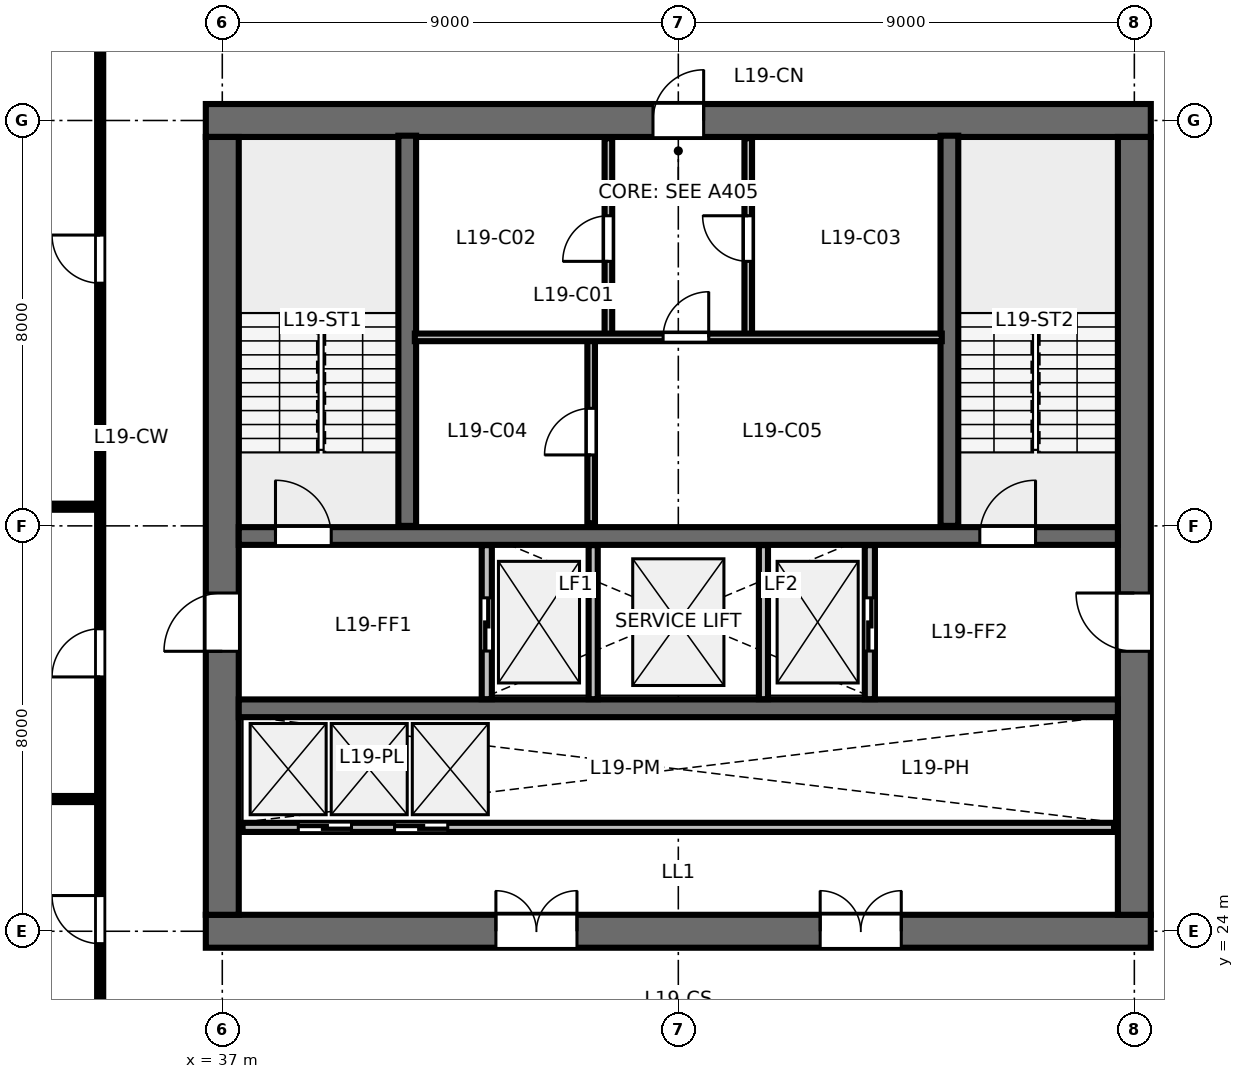
"""IFC4 building model, lengths in metres.
Left out: names, types, materials, properties, quantities, classifications, styles, units other than length and angle.
Written with IfcOpenShell. Run it as: python <this file> out.ifc"""

import sys

from ifc_helpers import new_model, si_unit, direction, frame, frame_2d, origin, place, context, subcontext, project, spatial, rectangle, extrude, element, fill, save


model = new_model("IFC4")
c1 = context("Model", 3, precision=1e-05, world=origin(), true_north=direction((0.0, 1.0)))
c2 = subcontext(c1, "Body", "Model", "MODEL_VIEW")
j1 = project(units=[si_unit("LENGTHUNIT", "METRE"), si_unit("PLANEANGLEUNIT", "RADIAN")], contexts=[c1])
p1 = place(None, origin())
s1 = spatial("IfcSite", under=j1, at=p1, CompositionType="ELEMENT")
p2 = place(p1, origin())
s2 = spatial("IfcBuilding", under=s1, at=p2, CompositionType="ELEMENT")
p3 = place(p2, frame((0.0, 0.0, 74.8)))
s3 = spatial("IfcBuildingStorey", under=s2, at=p3, CompositionType="ELEMENT", Elevation=74.8)
p4 = place(p3, frame((36.675, 24.0, 0.0), z_axis=(0.0, 0.0, 1.0), x_axis=(1.0, 0.0, 0.0)))
e1 = element("IfcWall", 1, at=p4, inside=s3, PredefinedType="SHEAR", context=c2, shape_type="SweptSolid", body=[
    extrude(rectangle(XDim=18.65, YDim=0.65, at=frame_2d((9.325, 0.0))), origin(), (0.0, 0.0, 1.0), 3.36),
])
p5 = place(p4, frame((5.725, 0.0, 0.0)))
e2 = element("IfcOpeningElement", 2, at=p5, cuts=e1, PredefinedType="OPENING", context=c2, shape_type="SweptSolid", body=[
    extrude(rectangle(XDim=1.6, YDim=2.15, at=frame_2d((0.8, 1.075))), frame((0.0, 0.335, 0.0), z_axis=(0.0, -1.0, 0.0), x_axis=(1.0, 0.0, 0.0)), (0.0, 0.0, 1.0), 0.67),
])
p6 = place(p4, frame((12.125, 0.0, 0.0)))
e3 = element("IfcOpeningElement", 3, at=p6, cuts=e1, PredefinedType="OPENING", context=c2, shape_type="SweptSolid", body=[
    extrude(rectangle(XDim=1.6, YDim=2.15, at=frame_2d((0.8, 1.075))), frame((0.0, 0.335, 0.0), z_axis=(0.0, -1.0, 0.0), x_axis=(1.0, 0.0, 0.0)), (0.0, 0.0, 1.0), 0.67),
])
p7 = place(p3, frame((36.675, 40.0, 0.0), z_axis=(0.0, 0.0, 1.0), x_axis=(1.0, 0.0, 0.0)))
e4 = element("IfcWall", 4, at=p7, inside=s3, PredefinedType="SHEAR", context=c2, shape_type="SweptSolid", body=[
    extrude(rectangle(XDim=18.65, YDim=0.65, at=frame_2d((9.325, 0.0))), origin(), (0.0, 0.0, 1.0), 3.36),
])
p8 = place(p7, frame((8.825, 0.0, 0.0)))
e5 = element("IfcOpeningElement", 5, at=p8, cuts=e4, PredefinedType="OPENING", context=c2, shape_type="SweptSolid", body=[
    extrude(rectangle(XDim=1.0, YDim=2.15, at=frame_2d((0.5, 1.075))), frame((0.0, 0.335, 0.0), z_axis=(0.0, -1.0, 0.0), x_axis=(1.0, 0.0, 0.0)), (0.0, 0.0, 1.0), 0.67),
])
p9 = place(p3, frame((37.0, 24.325, 0.0), z_axis=(0.0, 0.0, 1.0), x_axis=(0.0, 1.0, 0.0)))
e6 = element("IfcWall", 6, at=p9, inside=s3, PredefinedType="SHEAR", context=c2, shape_type="SweptSolid", body=[
    extrude(rectangle(XDim=15.35, YDim=0.65, at=frame_2d((7.675, 0.0))), origin(), (0.0, 0.0, 1.0), 3.36),
])
p10 = place(p9, frame((5.2, 0.0, 0.0)))
e7 = element("IfcOpeningElement", 7, at=p10, cuts=e6, PredefinedType="OPENING", context=c2, shape_type="SweptSolid", body=[
    extrude(rectangle(XDim=1.15, YDim=2.15, at=frame_2d((0.575, 1.075))), frame((0.0, 0.335, 0.0), z_axis=(0.0, -1.0, 0.0), x_axis=(1.0, 0.0, 0.0)), (0.0, 0.0, 1.0), 0.67),
])
p11 = place(p3, frame((55.0, 24.325, 0.0), z_axis=(0.0, 0.0, 1.0), x_axis=(0.0, 1.0, 0.0)))
e8 = element("IfcWall", 8, at=p11, inside=s3, PredefinedType="SHEAR", context=c2, shape_type="SweptSolid", body=[
    extrude(rectangle(XDim=15.35, YDim=0.65, at=frame_2d((7.675, 0.0))), origin(), (0.0, 0.0, 1.0), 3.36),
])
p12 = place(p11, frame((5.2, 0.0, 0.0)))
e9 = element("IfcOpeningElement", 9, at=p12, cuts=e8, PredefinedType="OPENING", context=c2, shape_type="SweptSolid", body=[
    extrude(rectangle(XDim=1.15, YDim=2.15, at=frame_2d((0.575, 1.075))), frame((0.0, 0.335, 0.0), z_axis=(0.0, -1.0, 0.0), x_axis=(1.0, 0.0, 0.0)), (0.0, 0.0, 1.0), 0.67),
])
p13 = place(p3, frame((37.325, 31.8, 0.0), z_axis=(0.0, 0.0, 1.0), x_axis=(1.0, 0.0, 0.0)))
e10 = element("IfcWall", 10, at=p13, inside=s3, PredefinedType="SHEAR", context=c2, shape_type="SweptSolid", body=[
    extrude(rectangle(XDim=17.35, YDim=0.35, at=frame_2d((8.675, 0.0))), origin(), (0.0, 0.0, 1.0), 3.36),
])
p14 = place(p13, frame((0.725, 0.0, 0.0)))
e11 = element("IfcOpeningElement", 11, at=p14, cuts=e10, PredefinedType="OPENING", context=c2, shape_type="SweptSolid", body=[
    extrude(rectangle(XDim=1.1, YDim=2.15, at=frame_2d((0.55, 1.075))), frame((0.0, 0.185, 0.0), z_axis=(0.0, -1.0, 0.0), x_axis=(1.0, 0.0, 0.0)), (0.0, 0.0, 1.0), 0.37),
])
p15 = place(p13, frame((14.625, 0.0, 0.0)))
e12 = element("IfcOpeningElement", 12, at=p15, cuts=e10, PredefinedType="OPENING", context=c2, shape_type="SweptSolid", body=[
    extrude(rectangle(XDim=1.1, YDim=2.15, at=frame_2d((0.55, 1.075))), frame((0.0, 0.185, 0.0), z_axis=(0.0, -1.0, 0.0), x_axis=(1.0, 0.0, 0.0)), (0.0, 0.0, 1.0), 0.37),
])
p16 = place(p3, frame((37.325, 28.4, 0.0), z_axis=(0.0, 0.0, 1.0), x_axis=(1.0, 0.0, 0.0)))
e13 = element("IfcWall", 13, at=p16, inside=s3, PredefinedType="SHEAR", context=c2, shape_type="SweptSolid", body=[
    extrude(rectangle(XDim=17.35, YDim=0.35, at=frame_2d((8.675, 0.0))), origin(), (0.0, 0.0, 1.0), 3.36),
])
for number, where, z_axis, x_axis in (
    (14, (40.65, 32.0, 0.0), (0.0, 0.0, 1.0), (0.0, 1.0, 0.0)),
    (15, (51.35, 32.0, 0.0), (0.0, 0.0, 1.0), (0.0, 1.0, 0.0)),
):
    element("IfcWall", number, at=place(p3, frame(where, z_axis=z_axis, x_axis=x_axis)), inside=s3, PredefinedType="SHEAR", context=c2, shape_type="SweptSolid", body=[
        extrude(rectangle(XDim=7.7, YDim=0.35, at=frame_2d((3.85, 0.0))), origin(), (0.0, 0.0, 1.0), 3.6),
    ])
p17 = place(p3, frame((44.62, 35.72, 0.0), z_axis=(0.0, 0.0, 1.0), x_axis=(0.0, 1.0, 0.0)))
e16 = element("IfcWall", 16, at=p17, inside=s3, PredefinedType="PARTITIONING", context=c2, shape_type="SweptSolid", body=[
    extrude(rectangle(XDim=3.93, YDim=0.15, at=frame_2d((1.965, 0.0))), origin(), (0.0, 0.0, 1.0), 3.36),
])
p18 = place(p17, frame((1.5, 0.0, 0.0)))
e17 = element("IfcOpeningElement", 17, at=p18, cuts=e16, PredefinedType="OPENING", context=c2, shape_type="SweptSolid", body=[
    extrude(rectangle(XDim=0.9, YDim=2.15, at=frame_2d((0.45, 1.075))), frame((0.0, 0.085, 0.0), z_axis=(0.0, -1.0, 0.0), x_axis=(1.0, 0.0, 0.0)), (0.0, 0.0, 1.0), 0.17),
])
p19 = place(p3, frame((47.38, 35.72, 0.0), z_axis=(0.0, 0.0, 1.0), x_axis=(0.0, 1.0, 0.0)))
e18 = element("IfcWall", 18, at=p19, inside=s3, PredefinedType="PARTITIONING", context=c2, shape_type="SweptSolid", body=[
    extrude(rectangle(XDim=3.93, YDim=0.15, at=frame_2d((1.965, 0.0))), origin(), (0.0, 0.0, 1.0), 3.36),
])
p20 = place(p19, frame((1.5, 0.0, 0.0)))
e19 = element("IfcOpeningElement", 19, at=p20, cuts=e18, PredefinedType="OPENING", context=c2, shape_type="SweptSolid", body=[
    extrude(rectangle(XDim=0.9, YDim=2.15, at=frame_2d((0.45, 1.075))), frame((0.0, 0.085, 0.0), z_axis=(0.0, -1.0, 0.0), x_axis=(1.0, 0.0, 0.0)), (0.0, 0.0, 1.0), 0.17),
])
p21 = place(p3, frame((44.28, 32.05, 0.0), z_axis=(0.0, 0.0, 1.0), x_axis=(0.0, 1.0, 0.0)))
e20 = element("IfcWall", 20, at=p21, inside=s3, PredefinedType="PARTITIONING", context=c2, shape_type="SweptSolid", body=[
    extrude(rectangle(XDim=3.67, YDim=0.15, at=frame_2d((1.835, 0.0))), origin(), (0.0, 0.0, 1.0), 3.36),
])
p22 = place(p21, frame((1.35, 0.0, 0.0)))
e21 = element("IfcOpeningElement", 21, at=p22, cuts=e20, PredefinedType="OPENING", context=c2, shape_type="SweptSolid", body=[
    extrude(rectangle(XDim=0.92, YDim=2.15, at=frame_2d((0.46, 1.075))), frame((0.0, 0.085, 0.0), z_axis=(0.0, -1.0, 0.0), x_axis=(1.0, 0.0, 0.0)), (0.0, 0.0, 1.0), 0.17),
])
p23 = place(p3, frame((40.8, 35.72, 0.0), z_axis=(0.0, 0.0, 1.0), x_axis=(1.0, 0.0, 0.0)))
e22 = element("IfcWall", 22, at=p23, inside=s3, PredefinedType="PARTITIONING", context=c2, shape_type="SweptSolid", body=[
    extrude(rectangle(XDim=10.4, YDim=0.15, at=frame_2d((5.2, 0.0))), origin(), (0.0, 0.0, 1.0), 3.36),
])
p24 = place(p23, frame((4.9, 0.0, 0.0)))
e23 = element("IfcOpeningElement", 23, at=p24, cuts=e22, PredefinedType="OPENING", context=c2, shape_type="SweptSolid", body=[
    extrude(rectangle(XDim=0.9, YDim=2.15, at=frame_2d((0.45, 1.075))), frame((0.0, 0.085, 0.0), z_axis=(0.0, -1.0, 0.0), x_axis=(1.0, 0.0, 0.0)), (0.0, 0.0, 1.0), 0.17),
])
p25 = place(p3, frame((42.22, 28.58, 0.0), z_axis=(0.0, 0.0, 1.0), x_axis=(0.0, 1.0, 0.0)))
e24 = element("IfcWall", 24, at=p25, inside=s3, PredefinedType="PARTITIONING", context=c2, shape_type="SweptSolid", body=[
    extrude(rectangle(XDim=3.04, YDim=0.2, at=frame_2d((1.52, 0.0))), origin(), (0.0, 0.0, 1.0), 3.36),
])
p26 = place(p25, frame((0.95, 0.0, 0.0)))
e25 = element("IfcOpeningElement", 25, at=p26, cuts=e24, PredefinedType="OPENING", context=c2, shape_type="SweptSolid", body=[
    extrude(rectangle(XDim=1.05, YDim=2.15, at=frame_2d((0.525, 1.075))), frame((0.0, 0.11, 0.0), z_axis=(0.0, -1.0, 0.0), x_axis=(1.0, 0.0, 0.0)), (0.0, 0.0, 1.0), 0.22),
])
p27 = place(p3, frame((49.78, 28.58, 0.0), z_axis=(0.0, 0.0, 1.0), x_axis=(0.0, 1.0, 0.0)))
e26 = element("IfcWall", 26, at=p27, inside=s3, PredefinedType="PARTITIONING", context=c2, shape_type="SweptSolid", body=[
    extrude(rectangle(XDim=3.04, YDim=0.2, at=frame_2d((1.52, 0.0))), origin(), (0.0, 0.0, 1.0), 3.36),
])
p28 = place(p27, frame((0.95, 0.0, 0.0)))
e27 = element("IfcOpeningElement", 27, at=p28, cuts=e26, PredefinedType="OPENING", context=c2, shape_type="SweptSolid", body=[
    extrude(rectangle(XDim=1.05, YDim=2.15, at=frame_2d((0.525, 1.075))), frame((0.0, 0.11, 0.0), z_axis=(0.0, -1.0, 0.0), x_axis=(1.0, 0.0, 0.0)), (0.0, 0.0, 1.0), 0.22),
])
for number, where, z_axis, x_axis in (
    (28, (44.32, 28.58, 0.0), (0.0, 0.0, 1.0), (0.0, 1.0, 0.0)),
    (29, (47.68, 28.58, 0.0), (0.0, 0.0, 1.0), (0.0, 1.0, 0.0)),
):
    element("IfcWall", number, at=place(p3, frame(where, z_axis=z_axis, x_axis=x_axis)), inside=s3, PredefinedType="PARTITIONING", context=c2, shape_type="SweptSolid", body=[
        extrude(rectangle(XDim=3.04, YDim=0.18, at=frame_2d((1.52, 0.0))), origin(), (0.0, 0.0, 1.0), 3.36),
    ])
p29 = place(p3, frame((37.4, 26.05, 0.0), z_axis=(0.0, 0.0, 1.0), x_axis=(1.0, 0.0, 0.0)))
e30 = element("IfcWall", 30, at=p29, inside=s3, PredefinedType="PARTITIONING", context=c2, shape_type="SweptSolid", body=[
    extrude(rectangle(XDim=17.2, YDim=0.18, at=frame_2d((8.6, 0.0))), origin(), (0.0, 0.0, 1.0), 3.36),
])
p30 = place(p29, frame((1.1, 0.0, 0.0)))
e31 = element("IfcOpeningElement", 31, at=p30, cuts=e30, PredefinedType="OPENING", context=c2, shape_type="SweptSolid", body=[
    extrude(rectangle(XDim=1.05, YDim=2.15, at=frame_2d((0.525, 1.075))), frame((0.0, 0.1, 0.0), z_axis=(0.0, -1.0, 0.0), x_axis=(1.0, 0.0, 0.0)), (0.0, 0.0, 1.0), 0.2),
])
p31 = place(p29, frame((3.0, 0.0, 0.0)))
e32 = element("IfcOpeningElement", 32, at=p31, cuts=e30, PredefinedType="OPENING", context=c2, shape_type="SweptSolid", body=[
    extrude(rectangle(XDim=1.05, YDim=2.15, at=frame_2d((0.525, 1.075))), frame((0.0, 0.1, 0.0), z_axis=(0.0, -1.0, 0.0), x_axis=(1.0, 0.0, 0.0)), (0.0, 0.0, 1.0), 0.2),
])
p32 = place(p3, frame((34.59, 26.61, 0.0), z_axis=(0.0, 0.0, 1.0), x_axis=(-1.0, 0.0, 0.0)))
e33 = element("IfcWall", 33, at=p32, inside=s3, PredefinedType="PARTITIONING", context=c2, shape_type="SweptSolid", body=[
    extrude(rectangle(XDim=13.41, YDim=0.12, at=frame_2d((6.705, 0.0))), origin(), (0.0, 0.0, 1.0), 2.64),
])
p33 = place(p32, frame((1.4, 0.0, 0.0)))
e34 = element("IfcOpeningElement", 34, at=p33, cuts=e33, PredefinedType="OPENING", context=c2, shape_type="SweptSolid", body=[
    extrude(rectangle(XDim=0.9, YDim=2.15, at=frame_2d((0.45, 1.075))), frame((0.0, 0.07, 0.0), z_axis=(0.0, -1.0, 0.0), x_axis=(1.0, 0.0, 0.0)), (0.0, 0.0, 1.0), 0.14),
])
p34 = place(p3, frame((34.59, 32.378, 0.0), z_axis=(0.0, 0.0, 1.0), x_axis=(-1.0, 0.0, 0.0)))
e35 = element("IfcWall", 35, at=p34, inside=s3, PredefinedType="PARTITIONING", context=c2, shape_type="SweptSolid", body=[
    extrude(rectangle(XDim=13.41, YDim=0.12, at=frame_2d((6.705, 0.0))), origin(), (0.0, 0.0, 1.0), 2.64),
])
p35 = place(p34, frame((1.4, 0.0, 0.0)))
e36 = element("IfcOpeningElement", 36, at=p35, cuts=e35, PredefinedType="OPENING", context=c2, shape_type="SweptSolid", body=[
    extrude(rectangle(XDim=0.9, YDim=2.15, at=frame_2d((0.45, 1.075))), frame((0.0, 0.07, 0.0), z_axis=(0.0, -1.0, 0.0), x_axis=(1.0, 0.0, 0.0)), (0.0, 0.0, 1.0), 0.14),
])
p36 = place(p3, frame((34.59, 21.65, 0.0), z_axis=(0.0, 0.0, 1.0), x_axis=(0.0, 1.0, 0.0)))
e37 = element("IfcWall", 37, at=p36, inside=s3, PredefinedType="PARTITIONING", context=c2, shape_type="SweptSolid", body=[
    extrude(rectangle(XDim=20.7, YDim=0.12, at=frame_2d((10.35, 0.0))), origin(), (0.0, 0.0, 1.0), 2.64),
])
p37 = place(p36, frame((2.105, 0.0, 0.0)))
e38 = element("IfcOpeningElement", 38, at=p37, cuts=e37, PredefinedType="OPENING", context=c2, shape_type="SweptSolid", body=[
    extrude(rectangle(XDim=0.95, YDim=2.15, at=frame_2d((0.475, 1.075))), frame((0.0, 0.07, 0.0), z_axis=(0.0, -1.0, 0.0), x_axis=(1.0, 0.0, 0.0)), (0.0, 0.0, 1.0), 0.14),
])
p38 = place(p36, frame((7.369, 0.0, 0.0)))
e39 = element("IfcOpeningElement", 39, at=p38, cuts=e37, PredefinedType="OPENING", context=c2, shape_type="SweptSolid", body=[
    extrude(rectangle(XDim=0.95, YDim=2.15, at=frame_2d((0.475, 1.075))), frame((0.0, 0.07, 0.0), z_axis=(0.0, -1.0, 0.0), x_axis=(1.0, 0.0, 0.0)), (0.0, 0.0, 1.0), 0.14),
])
p39 = place(p36, frame((15.139, 0.0, 0.0)))
e40 = element("IfcOpeningElement", 40, at=p39, cuts=e37, PredefinedType="OPENING", context=c2, shape_type="SweptSolid", body=[
    extrude(rectangle(XDim=0.95, YDim=2.15, at=frame_2d((0.475, 1.075))), frame((0.0, 0.07, 0.0), z_axis=(0.0, -1.0, 0.0), x_axis=(1.0, 0.0, 0.0)), (0.0, 0.0, 1.0), 0.14),
])
p40 = place(p14, origin())
e41 = element("IfcDoor", 41, at=p40, inside=s3, OperationType="SINGLE_SWING_LEFT", PredefinedType="DOOR", context=c2, shape_type="SweptSolid", body=[
    extrude(rectangle(XDim=1.1, YDim=2.15, at=frame_2d((0.55, 1.075))), frame((0.0, 0.025, 0.0), z_axis=(0.0, -1.0, 0.0), x_axis=(1.0, 0.0, 0.0)), (0.0, 0.0, 1.0), 0.05),
])
fill(e11, e41)
p41 = place(p15, origin())
e42 = element("IfcDoor", 42, at=p41, inside=s3, OperationType="SINGLE_SWING_RIGHT", PredefinedType="DOOR", context=c2, shape_type="SweptSolid", body=[
    extrude(rectangle(XDim=1.1, YDim=2.15, at=frame_2d((0.55, 1.075))), frame((0.0, 0.025, 0.0), z_axis=(0.0, -1.0, 0.0), x_axis=(1.0, 0.0, 0.0)), (0.0, 0.0, 1.0), 0.05),
])
fill(e12, e42)
p42 = place(p8, origin())
e43 = element("IfcDoor", 43, at=p42, inside=s3, OperationType="SINGLE_SWING_RIGHT", PredefinedType="DOOR", context=c2, shape_type="SweptSolid", body=[
    extrude(rectangle(XDim=1.0, YDim=2.15, at=frame_2d((0.5, 1.075))), frame((0.0, 0.025, 0.0), z_axis=(0.0, -1.0, 0.0), x_axis=(1.0, 0.0, 0.0)), (0.0, 0.0, 1.0), 0.05),
])
fill(e5, e43)
p43 = place(p10, origin())
e44 = element("IfcDoor", 44, at=p43, inside=s3, OperationType="SINGLE_SWING_LEFT", PredefinedType="DOOR", context=c2, shape_type="SweptSolid", body=[
    extrude(rectangle(XDim=1.15, YDim=2.15, at=frame_2d((0.575, 1.075))), frame((0.0, 0.025, 0.0), z_axis=(0.0, -1.0, 0.0), x_axis=(1.0, 0.0, 0.0)), (0.0, 0.0, 1.0), 0.05),
])
fill(e7, e44)
p44 = place(p12, origin())
e45 = element("IfcDoor", 45, at=p44, inside=s3, OperationType="SINGLE_SWING_RIGHT", PredefinedType="DOOR", context=c2, shape_type="SweptSolid", body=[
    extrude(rectangle(XDim=1.15, YDim=2.15, at=frame_2d((0.575, 1.075))), frame((0.0, 0.025, 0.0), z_axis=(0.0, -1.0, 0.0), x_axis=(1.0, 0.0, 0.0)), (0.0, 0.0, 1.0), 0.05),
])
fill(e9, e45)
p45 = place(p5, origin())
e46 = element("IfcDoor", 46, at=p45, inside=s3, OperationType="DOUBLE_DOOR_SINGLE_SWING", PredefinedType="DOOR", context=c2, shape_type="SweptSolid", body=[
    extrude(rectangle(XDim=1.6, YDim=2.15, at=frame_2d((0.8, 1.075))), frame((0.0, 0.025, 0.0), z_axis=(0.0, -1.0, 0.0), x_axis=(1.0, 0.0, 0.0)), (0.0, 0.0, 1.0), 0.05),
])
fill(e2, e46)
p46 = place(p6, origin())
e47 = element("IfcDoor", 47, at=p46, inside=s3, OperationType="DOUBLE_DOOR_SINGLE_SWING", PredefinedType="DOOR", context=c2, shape_type="SweptSolid", body=[
    extrude(rectangle(XDim=1.6, YDim=2.15, at=frame_2d((0.8, 1.075))), frame((0.0, 0.025, 0.0), z_axis=(0.0, -1.0, 0.0), x_axis=(1.0, 0.0, 0.0)), (0.0, 0.0, 1.0), 0.05),
])
fill(e3, e47)
p47 = place(p18, origin())
e48 = element("IfcDoor", 48, at=p47, inside=s3, OperationType="SINGLE_SWING_LEFT", PredefinedType="DOOR", context=c2, shape_type="SweptSolid", body=[
    extrude(rectangle(XDim=0.9, YDim=2.15, at=frame_2d((0.45, 1.075))), frame((0.0, 0.025, 0.0), z_axis=(0.0, -1.0, 0.0), x_axis=(1.0, 0.0, 0.0)), (0.0, 0.0, 1.0), 0.05),
])
fill(e17, e48)
p48 = place(p20, origin())
e49 = element("IfcDoor", 49, at=p48, inside=s3, OperationType="SINGLE_SWING_RIGHT", PredefinedType="DOOR", context=c2, shape_type="SweptSolid", body=[
    extrude(rectangle(XDim=0.9, YDim=2.15, at=frame_2d((0.45, 1.075))), frame((0.0, 0.025, 0.0), z_axis=(0.0, -1.0, 0.0), x_axis=(1.0, 0.0, 0.0)), (0.0, 0.0, 1.0), 0.05),
])
fill(e19, e49)
p49 = place(p22, origin())
e50 = element("IfcDoor", 50, at=p49, inside=s3, OperationType="SINGLE_SWING_LEFT", PredefinedType="DOOR", context=c2, shape_type="SweptSolid", body=[
    extrude(rectangle(XDim=0.92, YDim=2.15, at=frame_2d((0.46, 1.075))), frame((0.0, 0.025, 0.0), z_axis=(0.0, -1.0, 0.0), x_axis=(1.0, 0.0, 0.0)), (0.0, 0.0, 1.0), 0.05),
])
fill(e21, e50)
p50 = place(p24, origin())
e51 = element("IfcDoor", 51, at=p50, inside=s3, OperationType="SINGLE_SWING_RIGHT", PredefinedType="DOOR", context=c2, shape_type="SweptSolid", body=[
    extrude(rectangle(XDim=0.9, YDim=2.15, at=frame_2d((0.45, 1.075))), frame((0.0, 0.025, 0.0), z_axis=(0.0, -1.0, 0.0), x_axis=(1.0, 0.0, 0.0)), (0.0, 0.0, 1.0), 0.05),
])
fill(e23, e51)
p51 = place(p26, origin())
e52 = element("IfcDoor", 52, at=p51, inside=s3, OperationType="SLIDING_TO_LEFT", PredefinedType="DOOR", context=c2, shape_type="SweptSolid", body=[
    extrude(rectangle(XDim=1.05, YDim=2.15, at=frame_2d((0.525, 1.075))), frame((0.0, 0.025, 0.0), z_axis=(0.0, -1.0, 0.0), x_axis=(1.0, 0.0, 0.0)), (0.0, 0.0, 1.0), 0.05),
])
fill(e25, e52)
p52 = place(p28, origin())
e53 = element("IfcDoor", 53, at=p52, inside=s3, OperationType="SLIDING_TO_RIGHT", PredefinedType="DOOR", context=c2, shape_type="SweptSolid", body=[
    extrude(rectangle(XDim=1.05, YDim=2.15, at=frame_2d((0.525, 1.075))), frame((0.0, 0.025, 0.0), z_axis=(0.0, -1.0, 0.0), x_axis=(1.0, 0.0, 0.0)), (0.0, 0.0, 1.0), 0.05),
])
fill(e27, e53)
p53 = place(p30, origin())
e54 = element("IfcDoor", 54, at=p53, inside=s3, OperationType="SLIDING_TO_LEFT", PredefinedType="DOOR", context=c2, shape_type="SweptSolid", body=[
    extrude(rectangle(XDim=1.05, YDim=2.15, at=frame_2d((0.525, 1.075))), frame((0.0, 0.025, 0.0), z_axis=(0.0, -1.0, 0.0), x_axis=(1.0, 0.0, 0.0)), (0.0, 0.0, 1.0), 0.05),
])
fill(e31, e54)
p54 = place(p31, origin())
e55 = element("IfcDoor", 55, at=p54, inside=s3, OperationType="SLIDING_TO_RIGHT", PredefinedType="DOOR", context=c2, shape_type="SweptSolid", body=[
    extrude(rectangle(XDim=1.05, YDim=2.15, at=frame_2d((0.525, 1.075))), frame((0.0, 0.025, 0.0), z_axis=(0.0, -1.0, 0.0), x_axis=(1.0, 0.0, 0.0)), (0.0, 0.0, 1.0), 0.05),
])
fill(e32, e55)
p55 = place(p37, origin())
e56 = element("IfcDoor", 56, at=p55, inside=s3, OperationType="SINGLE_SWING_RIGHT", PredefinedType="DOOR", context=c2, shape_type="SweptSolid", body=[
    extrude(rectangle(XDim=0.95, YDim=2.15, at=frame_2d((0.475, 1.075))), frame((0.0, 0.025, 0.0), z_axis=(0.0, -1.0, 0.0), x_axis=(1.0, 0.0, 0.0)), (0.0, 0.0, 1.0), 0.05),
])
fill(e38, e56)
p56 = place(p38, origin())
e57 = element("IfcDoor", 57, at=p56, inside=s3, OperationType="SINGLE_SWING_LEFT", PredefinedType="DOOR", context=c2, shape_type="SweptSolid", body=[
    extrude(rectangle(XDim=0.95, YDim=2.15, at=frame_2d((0.475, 1.075))), frame((0.0, 0.025, 0.0), z_axis=(0.0, -1.0, 0.0), x_axis=(1.0, 0.0, 0.0)), (0.0, 0.0, 1.0), 0.05),
])
fill(e39, e57)
p57 = place(p39, origin())
e58 = element("IfcDoor", 58, at=p57, inside=s3, OperationType="SINGLE_SWING_RIGHT", PredefinedType="DOOR", context=c2, shape_type="SweptSolid", body=[
    extrude(rectangle(XDim=0.95, YDim=2.15, at=frame_2d((0.475, 1.075))), frame((0.0, 0.025, 0.0), z_axis=(0.0, -1.0, 0.0), x_axis=(1.0, 0.0, 0.0)), (0.0, 0.0, 1.0), 0.05),
])
fill(e40, e58)
save(model, sys.argv[1])
